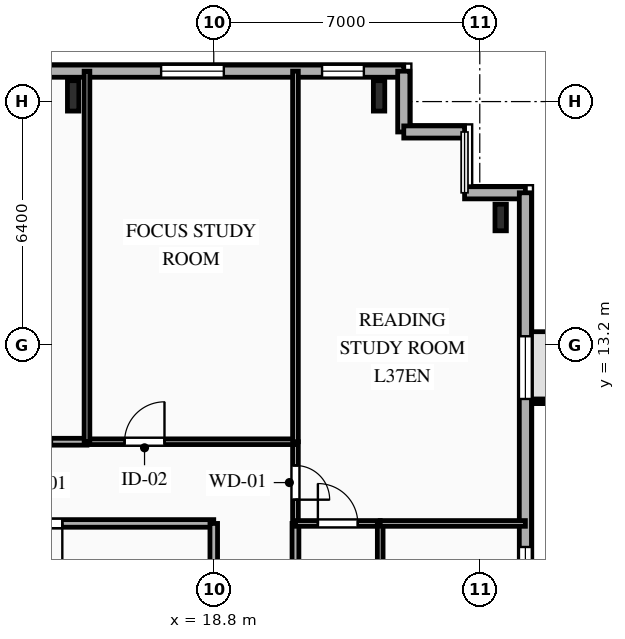
"""IFC4 building model, lengths in metres.
Left out: names, types, materials, properties, quantities, classifications, styles, units other than length and angle.
Written with IfcOpenShell. Run it as: python <this file> out.ifc"""

import sys

from ifc_helpers import new_model, si_unit, direction, frame, frame_2d, origin, origin_2d, place, context, subcontext, project, spatial, rectangle, i_section, extrude, element, fill, save


model = new_model("IFC4")
c1 = context("Model", 3, precision=1e-05, world=origin(), true_north=direction((0.0, 1.0)))
c2 = subcontext(c1, "Body", "Model", "MODEL_VIEW")
j1 = project(units=[si_unit("LENGTHUNIT", "METRE"), si_unit("PLANEANGLEUNIT", "RADIAN")], contexts=[c1])
p1 = place(None, origin())
s1 = spatial("IfcSite", under=j1, at=p1, CompositionType="ELEMENT")
p2 = place(p1, origin())
s2 = spatial("IfcBuilding", under=s1, at=p2, CompositionType="ELEMENT")
p3 = place(p2, frame((0.0, 0.0, 134.35)))
s3 = spatial("IfcBuildingStorey", under=s2, at=p3, CompositionType="ELEMENT", Elevation=134.35)
for number, where, z_axis, x_axis in (
    (1, (23.15, 19.75, 0.0), (0.0, 0.0, 1.0), (1.0, 0.0, 0.0)),
    (2, (15.1, 19.75, 0.0), (0.0, 0.0, 1.0), (1.0, 0.0, 0.0)),
):
    element("IfcColumn", number, at=place(p3, frame(where, z_axis=z_axis, x_axis=x_axis)), inside=s3, PredefinedType="COLUMN", context=c2, shape_type="SweptSolid", body=[
        extrude(i_section(OverallWidth=0.3, OverallDepth=0.8, WebThickness=0.018, FlangeThickness=0.033, FilletRadius=0.03, at=origin_2d()), origin(), (0.0, 0.0, 1.0), 3.35),
    ])
p4 = place(p3, frame((26.35, 16.55, 0.0), z_axis=(0.0, 0.0, 1.0), x_axis=(1.0, 0.0, 0.0)))
e3 = element("IfcColumn", 3, at=p4, inside=s3, PredefinedType="COLUMN", context=c2, shape_type="SweptSolid", body=[
    extrude(i_section(OverallWidth=0.3, OverallDepth=0.7, WebThickness=0.017, FlangeThickness=0.032, FilletRadius=0.027, at=origin_2d()), origin(), (0.0, 0.0, 1.0), 3.35),
])
p5 = place(p3, frame((-25.8, 20.4, 0.0), z_axis=(0.0, 0.0, 1.0), x_axis=(1.0, 0.0, 0.0)))
e4 = element("IfcWall", 4, at=p5, inside=s3, PredefinedType="SOLIDWALL", context=c2, shape_type="SweptSolid", body=[
    extrude(rectangle(XDim=49.6, YDim=0.32, at=frame_2d((24.8, 0.0))), origin(), (0.0, 0.0, 1.0), 3.04),
])
p6 = place(p5, frame((2.135, 0.0, 0.85)))
e5 = element("IfcOpeningElement", 5, at=p6, cuts=e4, PredefinedType="OPENING", context=c2, shape_type="SweptSolid", body=[
    extrude(rectangle(XDim=1.65, YDim=1.85, at=frame_2d((0.825, 0.925))), frame((0.0, 0.17, 0.0), z_axis=(0.0, -1.0, 0.0), x_axis=(1.0, 0.0, 0.0)), (0.0, 0.0, 1.0), 0.34),
])
p7 = place(p5, frame((6.706, 0.0, 0.85)))
e6 = element("IfcOpeningElement", 6, at=p7, cuts=e4, PredefinedType="OPENING", context=c2, shape_type="SweptSolid", body=[
    extrude(rectangle(XDim=1.65, YDim=1.85, at=frame_2d((0.825, 0.925))), frame((0.0, 0.17, 0.0), z_axis=(0.0, -1.0, 0.0), x_axis=(1.0, 0.0, 0.0)), (0.0, 0.0, 1.0), 0.34),
])
p8 = place(p5, frame((14.76, 0.0, 0.85)))
e7 = element("IfcOpeningElement", 7, at=p8, cuts=e4, PredefinedType="OPENING", context=c2, shape_type="SweptSolid", body=[
    extrude(rectangle(XDim=1.6, YDim=1.85, at=frame_2d((0.8, 0.925))), frame((0.0, 0.17, 0.0), z_axis=(0.0, -1.0, 0.0), x_axis=(1.0, 0.0, 0.0)), (0.0, 0.0, 1.0), 0.34),
])
p9 = place(p5, frame((19.26, 0.0, 0.85)))
e8 = element("IfcOpeningElement", 8, at=p9, cuts=e4, PredefinedType="OPENING", context=c2, shape_type="SweptSolid", body=[
    extrude(rectangle(XDim=2.2, YDim=1.85, at=frame_2d((1.1, 0.925))), frame((0.0, 0.17, 0.0), z_axis=(0.0, -1.0, 0.0), x_axis=(1.0, 0.0, 0.0)), (0.0, 0.0, 1.0), 0.34),
])
p10 = place(p5, frame((25.26, 0.0, 0.85)))
e9 = element("IfcOpeningElement", 9, at=p10, cuts=e4, PredefinedType="OPENING", context=c2, shape_type="SweptSolid", body=[
    extrude(rectangle(XDim=2.2, YDim=1.85, at=frame_2d((1.1, 0.925))), frame((0.0, 0.17, 0.0), z_axis=(0.0, -1.0, 0.0), x_axis=(1.0, 0.0, 0.0)), (0.0, 0.0, 1.0), 0.34),
])
p11 = place(p5, frame((30.4, 0.0, 0.85)))
e10 = element("IfcOpeningElement", 10, at=p11, cuts=e4, PredefinedType="OPENING", context=c2, shape_type="SweptSolid", body=[
    extrude(rectangle(XDim=2.2, YDim=1.85, at=frame_2d((1.1, 0.925))), frame((0.0, 0.17, 0.0), z_axis=(0.0, -1.0, 0.0), x_axis=(1.0, 0.0, 0.0)), (0.0, 0.0, 1.0), 0.34),
])
p12 = place(p5, frame((37.18, 0.0, 0.85)))
e11 = element("IfcOpeningElement", 11, at=p12, cuts=e4, PredefinedType="OPENING", context=c2, shape_type="SweptSolid", body=[
    extrude(rectangle(XDim=2.2, YDim=1.85, at=frame_2d((1.1, 0.925))), frame((0.0, 0.17, 0.0), z_axis=(0.0, -1.0, 0.0), x_axis=(1.0, 0.0, 0.0)), (0.0, 0.0, 1.0), 0.34),
])
p13 = place(p5, frame((43.215, 0.0, 0.85)))
e12 = element("IfcOpeningElement", 12, at=p13, cuts=e4, PredefinedType="OPENING", context=c2, shape_type="SweptSolid", body=[
    extrude(rectangle(XDim=1.65, YDim=1.85, at=frame_2d((0.825, 0.925))), frame((0.0, 0.17, 0.0), z_axis=(0.0, -1.0, 0.0), x_axis=(1.0, 0.0, 0.0)), (0.0, 0.0, 1.0), 0.34),
])
p14 = place(p5, frame((47.45, 0.0, 0.85)))
e13 = element("IfcOpeningElement", 13, at=p14, cuts=e4, PredefinedType="OPENING", context=c2, shape_type="SweptSolid", body=[
    extrude(rectangle(XDim=1.1, YDim=1.85, at=frame_2d((0.55, 0.925))), frame((0.0, 0.17, 0.0), z_axis=(0.0, -1.0, 0.0), x_axis=(1.0, 0.0, 0.0)), (0.0, 0.0, 1.0), 0.34),
])
for number, where, z_axis, x_axis in (
    (14, (23.8, 20.4, 0.0), (0.0, 0.0, 1.0), (0.0, -1.0, 0.0)),
    (15, (23.8, 18.8, 0.0), (0.0, 0.0, 1.0), (1.0, 0.0, 0.0)),
):
    element("IfcWall", number, at=place(p3, frame(where, z_axis=z_axis, x_axis=x_axis)), inside=s3, PredefinedType="SOLIDWALL", context=c2, shape_type="SweptSolid", body=[
        extrude(rectangle(XDim=1.6, YDim=0.32, at=frame_2d((0.8, 0.0))), origin(), (0.0, 0.0, 1.0), 3.04),
    ])
p15 = place(p3, frame((25.4, 17.2, 0.0), z_axis=(0.0, 0.0, 1.0), x_axis=(1.0, 0.0, 0.0)))
e16 = element("IfcWall", 16, at=p15, inside=s3, PredefinedType="SOLIDWALL", context=c2, shape_type="SweptSolid", body=[
    extrude(rectangle(XDim=1.6, YDim=0.32, at=frame_2d((0.8, 0.0))), origin(), (0.0, 0.0, 1.0), 3.04),
])
p16 = place(p3, frame((27.0, 17.2, 0.0), z_axis=(0.0, 0.0, 1.0), x_axis=(0.0, -1.0, 0.0)))
e17 = element("IfcWall", 17, at=p16, inside=s3, PredefinedType="SOLIDWALL", context=c2, shape_type="SweptSolid", body=[
    extrude(rectangle(XDim=29.6, YDim=0.32, at=frame_2d((14.8, 0.0))), origin(), (0.0, 0.0, 1.0), 3.04),
])
p17 = place(p16, frame((3.775, 0.0, 0.85)))
e18 = element("IfcOpeningElement", 18, at=p17, cuts=e17, PredefinedType="OPENING", context=c2, shape_type="SweptSolid", body=[
    extrude(rectangle(XDim=1.65, YDim=1.85, at=frame_2d((0.825, 0.925))), frame((0.0, 0.17, 0.0), z_axis=(0.0, -1.0, 0.0), x_axis=(1.0, 0.0, 0.0)), (0.0, 0.0, 1.0), 0.34),
])
p18 = place(p16, frame((9.32, 0.0, 0.85)))
e19 = element("IfcOpeningElement", 19, at=p18, cuts=e17, PredefinedType="OPENING", context=c2, shape_type="SweptSolid", body=[
    extrude(rectangle(XDim=1.6, YDim=1.85, at=frame_2d((0.8, 0.925))), frame((0.0, 0.17, 0.0), z_axis=(0.0, -1.0, 0.0), x_axis=(1.0, 0.0, 0.0)), (0.0, 0.0, 1.0), 0.34),
])
p19 = place(p16, frame((12.2, 0.0, 0.85)))
e20 = element("IfcOpeningElement", 20, at=p19, cuts=e17, PredefinedType="OPENING", context=c2, shape_type="SweptSolid", body=[
    extrude(rectangle(XDim=1.6, YDim=1.85, at=frame_2d((0.8, 0.925))), frame((0.0, 0.17, 0.0), z_axis=(0.0, -1.0, 0.0), x_axis=(1.0, 0.0, 0.0)), (0.0, 0.0, 1.0), 0.34),
])
p20 = place(p16, frame((15.0, 0.0, 0.85)))
e21 = element("IfcOpeningElement", 21, at=p20, cuts=e17, PredefinedType="OPENING", context=c2, shape_type="SweptSolid", body=[
    extrude(rectangle(XDim=1.6, YDim=1.85, at=frame_2d((0.8, 0.925))), frame((0.0, 0.17, 0.0), z_axis=(0.0, -1.0, 0.0), x_axis=(1.0, 0.0, 0.0)), (0.0, 0.0, 1.0), 0.34),
])
p21 = place(p16, frame((17.865, 0.0, 0.85)))
e22 = element("IfcOpeningElement", 22, at=p21, cuts=e17, PredefinedType="OPENING", context=c2, shape_type="SweptSolid", body=[
    extrude(rectangle(XDim=1.95, YDim=1.85, at=frame_2d((0.975, 0.925))), frame((0.0, 0.17, 0.0), z_axis=(0.0, -1.0, 0.0), x_axis=(1.0, 0.0, 0.0)), (0.0, 0.0, 1.0), 0.34),
])
p22 = place(p16, frame((25.175, 0.0, 0.85)))
e23 = element("IfcOpeningElement", 23, at=p22, cuts=e17, PredefinedType="OPENING", context=c2, shape_type="SweptSolid", body=[
    extrude(rectangle(XDim=1.65, YDim=1.85, at=frame_2d((0.825, 0.925))), frame((0.0, 0.17, 0.0), z_axis=(0.0, -1.0, 0.0), x_axis=(1.0, 0.0, 0.0)), (0.0, 0.0, 1.0), 0.34),
])
p23 = place(p3, frame((18.8, 8.5, 0.0), z_axis=(0.0, 0.0, 1.0), x_axis=(-1.0, 0.0, 0.0)))
e24 = element("IfcWall", 24, at=p23, inside=s3, PredefinedType="PARTITIONING", context=c2, shape_type="SweptSolid", body=[
    extrude(rectangle(XDim=6.8, YDim=0.2, at=frame_2d((3.4, 0.0))), origin(), (0.0, 0.0, 1.0), 3.04),
])
p24 = place(p23, frame((3.985, 0.0, 0.0)))
e25 = element("IfcOpeningElement", 25, at=p24, cuts=e24, PredefinedType="OPENING", context=c2, shape_type="SweptSolid", body=[
    extrude(rectangle(XDim=1.1, YDim=2.15, at=frame_2d((0.55, 1.075))), frame((0.0, 0.11, 0.0), z_axis=(0.0, -1.0, 0.0), x_axis=(1.0, 0.0, 0.0)), (0.0, 0.0, 1.0), 0.22),
])
p25 = place(p3, frame((18.8, 5.6, 0.0), z_axis=(0.0, 0.0, 1.0), x_axis=(0.0, 1.0, 0.0)))
e26 = element("IfcWall", 26, at=p25, inside=s3, PredefinedType="PARTITIONING", context=c2, shape_type="SweptSolid", body=[
    extrude(rectangle(XDim=2.9, YDim=0.2, at=frame_2d((1.45, 0.0))), origin(), (0.0, 0.0, 1.0), 2.525),
])
p26 = place(p3, frame((20.95, 10.65, 0.0), z_axis=(0.0, 0.0, 1.0), x_axis=(0.0, -1.0, 0.0)))
e27 = element("IfcWall", 27, at=p26, inside=s3, PredefinedType="PARTITIONING", context=c2, shape_type="SweptSolid", body=[
    extrude(rectangle(XDim=2.15, YDim=0.15, at=frame_2d((1.075, 0.0))), origin(), (0.0, 0.0, 1.0), 3.04),
])
p27 = place(p26, frame((0.625, 0.0, 0.0)))
e28 = element("IfcOpeningElement", 28, at=p27, cuts=e27, PredefinedType="OPENING", context=c2, shape_type="SweptSolid", body=[
    extrude(rectangle(XDim=0.9, YDim=2.1, at=frame_2d((0.45, 1.05))), frame((0.0, 0.085, 0.0), z_axis=(0.0, -1.0, 0.0), x_axis=(1.0, 0.0, 0.0)), (0.0, 0.0, 1.0), 0.17),
])
p28 = place(p3, frame((11.929, 10.65, 0.0), z_axis=(0.0, 0.0, 1.0), x_axis=(1.0, 0.0, 0.0)))
e29 = element("IfcWall", 29, at=p28, inside=s3, PredefinedType="PARTITIONING", context=c2, shape_type="SweptSolid", body=[
    extrude(rectangle(XDim=3.535, YDim=0.18, at=frame_2d((1.768, 0.0))), origin(), (0.0, 0.0, 1.0), 3.04),
])
p29 = place(p28, frame((1.611, 0.0, 0.0)))
e30 = element("IfcOpeningElement", 30, at=p29, cuts=e29, PredefinedType="OPENING", context=c2, shape_type="SweptSolid", body=[
    extrude(rectangle(XDim=1.0, YDim=2.15, at=frame_2d((0.5, 1.075))), frame((0.0, 0.1, 0.0), z_axis=(0.0, -1.0, 0.0), x_axis=(1.0, 0.0, 0.0)), (0.0, 0.0, 1.0), 0.2),
])
p30 = place(p3, frame((15.464, 10.65, 0.0), z_axis=(0.0, 0.0, 1.0), x_axis=(1.0, 0.0, 0.0)))
e31 = element("IfcWall", 31, at=p30, inside=s3, PredefinedType="PARTITIONING", context=c2, shape_type="SweptSolid", body=[
    extrude(rectangle(XDim=5.486, YDim=0.15, at=frame_2d((2.743, 0.0))), origin(), (0.0, 0.0, 1.0), 3.04),
])
p31 = place(p30, frame((0.99, 0.0, 0.0)))
e32 = element("IfcOpeningElement", 32, at=p31, cuts=e31, PredefinedType="OPENING", context=c2, shape_type="SweptSolid", body=[
    extrude(rectangle(XDim=1.05, YDim=2.15, at=frame_2d((0.525, 1.075))), frame((0.0, 0.085, 0.0), z_axis=(0.0, -1.0, 0.0), x_axis=(1.0, 0.0, 0.0)), (0.0, 0.0, 1.0), 0.17),
])
p32 = place(p3, frame((20.95, 8.5, 0.0), z_axis=(0.0, 0.0, 1.0), x_axis=(0.0, -1.0, 0.0)))
e33 = element("IfcWall", 33, at=p32, inside=s3, PredefinedType="PARTITIONING", context=c2, shape_type="SweptSolid", body=[
    extrude(rectangle(XDim=14.1, YDim=0.18, at=frame_2d((7.05, 0.0))), origin(), (0.0, 0.0, 1.0), 3.04),
])
p33 = place(p32, frame((8.042, 0.0, 0.0)))
e34 = element("IfcOpeningElement", 34, at=p33, cuts=e33, PredefinedType="OPENING", context=c2, shape_type="SweptSolid", body=[
    extrude(rectangle(XDim=1.0, YDim=2.15, at=frame_2d((0.5, 1.075))), frame((0.0, 0.1, 0.0), z_axis=(0.0, -1.0, 0.0), x_axis=(1.0, 0.0, 0.0)), (0.0, 0.0, 1.0), 0.2),
])
p34 = place(p3, frame((20.95, 8.5, 0.0), z_axis=(0.0, 0.0, 1.0), x_axis=(1.0, 0.0, 0.0)))
e35 = element("IfcWall", 35, at=p34, inside=s3, PredefinedType="PARTITIONING", context=c2, shape_type="SweptSolid", body=[
    extrude(rectangle(XDim=2.23, YDim=0.15, at=frame_2d((1.115, 0.0))), origin(), (0.0, 0.0, 1.0), 3.04),
])
p35 = place(p34, frame((0.59, 0.0, 0.0)))
e36 = element("IfcOpeningElement", 36, at=p35, cuts=e35, PredefinedType="OPENING", context=c2, shape_type="SweptSolid", body=[
    extrude(rectangle(XDim=1.05, YDim=2.15, at=frame_2d((0.525, 1.075))), frame((0.0, 0.085, 0.0), z_axis=(0.0, -1.0, 0.0), x_axis=(1.0, 0.0, 0.0)), (0.0, 0.0, 1.0), 0.17),
])
p36 = place(p3, frame((23.18, 8.5, 0.0), z_axis=(0.0, 0.0, 1.0), x_axis=(0.0, -1.0, 0.0)))
e37 = element("IfcWall", 37, at=p36, inside=s3, PredefinedType="PARTITIONING", context=c2, shape_type="SweptSolid", body=[
    extrude(rectangle(XDim=2.82, YDim=0.15, at=frame_2d((1.41, 0.0))), origin(), (0.0, 0.0, 1.0), 3.04),
])
p37 = place(p36, frame((1.201, 0.0, 0.0)))
e38 = element("IfcOpeningElement", 38, at=p37, cuts=e37, PredefinedType="OPENING", context=c2, shape_type="SweptSolid", body=[
    extrude(rectangle(XDim=0.95, YDim=2.1, at=frame_2d((0.475, 1.05))), frame((0.0, 0.085, 0.0), z_axis=(0.0, -1.0, 0.0), x_axis=(1.0, 0.0, 0.0)), (0.0, 0.0, 1.0), 0.17),
])
p38 = place(p3, frame((27.0, 8.5, 0.0), z_axis=(0.0, 0.0, 1.0), x_axis=(-1.0, 0.0, 0.0)))
e39 = element("IfcWall", 39, at=p38, inside=s3, PredefinedType="PARTITIONING", context=c2, shape_type="SweptSolid", body=[
    extrude(rectangle(XDim=3.82, YDim=0.15, at=frame_2d((1.91, 0.0))), origin(), (0.0, 0.0, 1.0), 3.04),
])
for number, where, z_axis, x_axis in (
    (40, (20.95, 10.65, 0.0), (0.0, 0.0, 1.0), (0.0, 1.0, 0.0)),
    (41, (15.464, 20.4, 0.0), (0.0, 0.0, 1.0), (0.0, -1.0, 0.0)),
):
    element("IfcWall", number, at=place(p3, frame(where, z_axis=z_axis, x_axis=x_axis)), inside=s3, PredefinedType="PARTITIONING", context=c2, shape_type="SweptSolid", body=[
        extrude(rectangle(XDim=9.75, YDim=0.15, at=frame_2d((4.875, 0.0))), origin(), (0.0, 0.0, 1.0), 2.525),
    ])
p39 = place(p13, origin())
e42 = element("IfcWindow", 42, at=p39, inside=s3, PartitioningType="SINGLE_PANEL", PredefinedType="WINDOW", context=c2, shape_type="SweptSolid", body=[
    extrude(rectangle(XDim=1.65, YDim=1.85, at=frame_2d((0.825, 0.925))), frame((0.0, 0.03, 0.0), z_axis=(0.0, -1.0, 0.0), x_axis=(1.0, 0.0, 0.0)), (0.0, 0.0, 1.0), 0.06),
])
fill(e12, e42)
p40 = place(p14, origin())
e43 = element("IfcWindow", 43, at=p40, inside=s3, PartitioningType="SINGLE_PANEL", PredefinedType="WINDOW", context=c2, shape_type="SweptSolid", body=[
    extrude(rectangle(XDim=1.1, YDim=1.85, at=frame_2d((0.55, 0.925))), frame((0.0, 0.03, 0.0), z_axis=(0.0, -1.0, 0.0), x_axis=(1.0, 0.0, 0.0)), (0.0, 0.0, 1.0), 0.06),
])
fill(e13, e43)
p41 = place(p17, origin())
e44 = element("IfcWindow", 44, at=p41, inside=s3, PartitioningType="SINGLE_PANEL", PredefinedType="WINDOW", context=c2, shape_type="SweptSolid", body=[
    extrude(rectangle(XDim=1.65, YDim=1.85, at=frame_2d((0.825, 0.925))), frame((0.0, 0.03, 0.0), z_axis=(0.0, -1.0, 0.0), x_axis=(1.0, 0.0, 0.0)), (0.0, 0.0, 1.0), 0.06),
])
fill(e18, e44)
p42 = place(p18, origin())
e45 = element("IfcWindow", 45, at=p42, inside=s3, PartitioningType="SINGLE_PANEL", PredefinedType="WINDOW", context=c2, shape_type="SweptSolid", body=[
    extrude(rectangle(XDim=1.6, YDim=1.85, at=frame_2d((0.8, 0.925))), frame((0.0, 0.03, 0.0), z_axis=(0.0, -1.0, 0.0), x_axis=(1.0, 0.0, 0.0)), (0.0, 0.0, 1.0), 0.06),
])
fill(e19, e45)
p43 = place(p24, origin())
e46 = element("IfcDoor", 46, at=p43, inside=s3, OperationType="SINGLE_SWING_LEFT", PredefinedType="DOOR", context=c2, shape_type="SweptSolid", body=[
    extrude(rectangle(XDim=1.1, YDim=2.15, at=frame_2d((0.55, 1.075))), frame((0.0, 0.025, 0.0), z_axis=(0.0, -1.0, 0.0), x_axis=(1.0, 0.0, 0.0)), (0.0, 0.0, 1.0), 0.05),
])
fill(e25, e46)
p44 = place(p27, origin())
e47 = element("IfcDoor", 47, at=p44, inside=s3, OperationType="SINGLE_SWING_RIGHT", PredefinedType="DOOR", context=c2, shape_type="SweptSolid", body=[
    extrude(rectangle(XDim=0.9, YDim=2.1, at=frame_2d((0.45, 1.05))), frame((0.0, 0.025, 0.0), z_axis=(0.0, -1.0, 0.0), x_axis=(1.0, 0.0, 0.0)), (0.0, 0.0, 1.0), 0.05),
])
fill(e28, e47)
p45 = place(p29, origin())
e48 = element("IfcDoor", 48, at=p45, inside=s3, OperationType="SINGLE_SWING_LEFT", PredefinedType="DOOR", context=c2, shape_type="SweptSolid", body=[
    extrude(rectangle(XDim=1.0, YDim=2.15, at=frame_2d((0.5, 1.075))), frame((0.0, 0.025, 0.0), z_axis=(0.0, -1.0, 0.0), x_axis=(1.0, 0.0, 0.0)), (0.0, 0.0, 1.0), 0.05),
])
fill(e30, e48)
p46 = place(p31, origin())
e49 = element("IfcDoor", 49, at=p46, inside=s3, OperationType="SINGLE_SWING_RIGHT", PredefinedType="DOOR", context=c2, shape_type="SweptSolid", body=[
    extrude(rectangle(XDim=1.05, YDim=2.15, at=frame_2d((0.525, 1.075))), frame((0.0, 0.025, 0.0), z_axis=(0.0, -1.0, 0.0), x_axis=(1.0, 0.0, 0.0)), (0.0, 0.0, 1.0), 0.05),
])
fill(e32, e49)
p47 = place(p35, origin())
e50 = element("IfcDoor", 50, at=p47, inside=s3, OperationType="SINGLE_SWING_LEFT", PredefinedType="DOOR", context=c2, shape_type="SweptSolid", body=[
    extrude(rectangle(XDim=1.05, YDim=2.15, at=frame_2d((0.525, 1.075))), frame((0.0, 0.025, 0.0), z_axis=(0.0, -1.0, 0.0), x_axis=(1.0, 0.0, 0.0)), (0.0, 0.0, 1.0), 0.05),
])
fill(e36, e50)
save(model, sys.argv[1])
